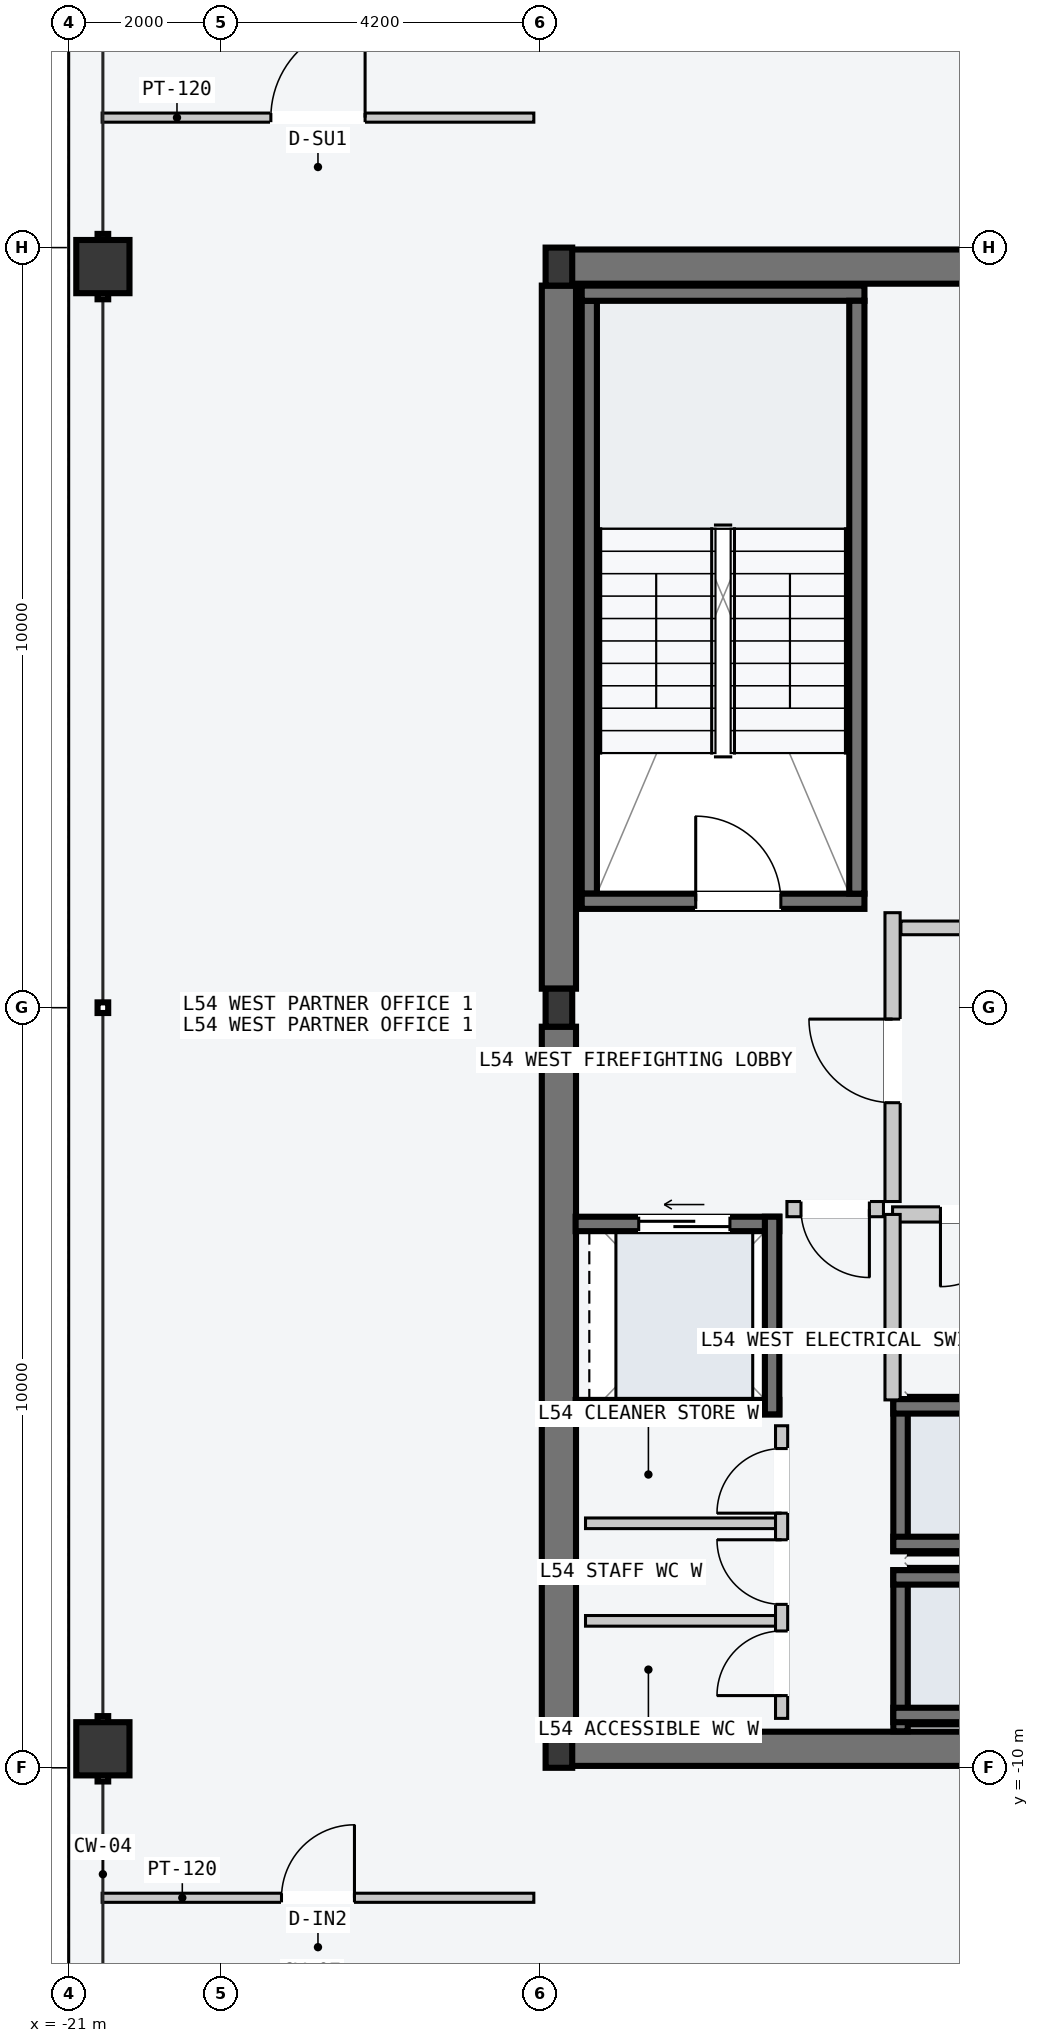
"""IFC4 building model, lengths in metres.
Left out: names, types, materials, properties, quantities, classifications, styles, units other than length and angle.
Written with IfcOpenShell. Run it as: python <this file> out.ifc"""

import sys

from ifc_helpers import new_model, si_unit, direction, frame, frame_2d, origin, origin_2d, place, context, subcontext, project, spatial, rectangle, hollow_rectangle, i_section, extrude, element, fill, save


model = new_model("IFC4")
c1 = context("Model", 3, precision=1e-05, world=origin(), true_north=direction((0.0, 1.0)))
c2 = subcontext(c1, "Body", "Model", "MODEL_VIEW")
j1 = project(units=[si_unit("LENGTHUNIT", "METRE"), si_unit("PLANEANGLEUNIT", "RADIAN")], contexts=[c1])
p1 = place(None, origin())
s1 = spatial("IfcSite", under=j1, at=p1, CompositionType="ELEMENT")
p2 = place(p1, origin())
s2 = spatial("IfcBuilding", under=s1, at=p2, CompositionType="ELEMENT")
p3 = place(p2, frame((0.0, 0.0, 205.5)))
s3 = spatial("IfcBuildingStorey", under=s2, at=p3, CompositionType="ELEMENT", Elevation=205.5)
for number, where, z_axis, x_axis in (
    (1, (-14.53, -9.75, -0.2), (0.0, 0.0, 1.0), (1.0, 0.0, 0.0)),
    (2, (-14.53, 9.75, -0.2), (0.0, 0.0, 1.0), (1.0, 0.0, 0.0)),
):
    element("IfcWall", number, at=place(p3, frame(where, z_axis=z_axis, x_axis=x_axis)), inside=s3, PredefinedType="SHEAR", context=c2, shape_type="SweptSolid", body=[
        extrude(rectangle(XDim=6.46, YDim=0.45, at=frame_2d((3.23, 0.0))), origin(), (0.0, 0.0, 1.0), 3.6),
    ])
for number, where, z_axis, x_axis in (
    (3, (-14.55, -9.5, -0.2), (0.0, 0.0, 1.0), (0.0, 1.0, 0.0)),
    (4, (-14.55, 0.25, -0.2), (0.0, 0.0, 1.0), (0.0, 1.0, 0.0)),
):
    element("IfcWall", number, at=place(p3, frame(where, z_axis=z_axis, x_axis=x_axis)), inside=s3, PredefinedType="SHEAR", context=c2, shape_type="SweptSolid", body=[
        extrude(rectangle(XDim=9.25, YDim=0.45, at=frame_2d((4.625, 0.0))), origin(), (0.0, 0.0, 1.0), 3.6),
    ])
p4 = place(p3, frame((-14.15, 1.5, -0.2), z_axis=(0.0, 0.0, 1.0), x_axis=(0.0, 1.0, 0.0)))
e5 = element("IfcWall", 5, at=p4, inside=s3, PredefinedType="SOLIDWALL", context=c2, shape_type="SweptSolid", body=[
    extrude(rectangle(XDim=7.8, YDim=0.2, at=frame_2d((3.9, 0.0))), origin(), (0.0, 0.0, 1.0), 3.6),
])
p5 = place(p3, frame((-14.25, 1.4, -0.2), z_axis=(0.0, 0.0, 1.0), x_axis=(1.0, 0.0, 0.0)))
e6 = element("IfcWall", 6, at=p5, inside=s3, PredefinedType="SOLIDWALL", context=c2, shape_type="SweptSolid", body=[
    extrude(rectangle(XDim=3.72, YDim=0.2, at=frame_2d((1.86, 0.0))), origin(), (0.0, 0.0, 1.0), 3.6),
])
p6 = place(p5, frame((1.5, 0.0, 0.2)))
e7 = element("IfcOpeningElement", 7, at=p6, cuts=e6, PredefinedType="OPENING", context=c2, shape_type="SweptSolid", body=[
    extrude(rectangle(XDim=1.12, YDim=2.18, at=frame_2d((0.56, 1.09))), frame((0.0, 0.11, 0.0), z_axis=(0.0, -1.0, 0.0), x_axis=(1.0, 0.0, 0.0)), (0.0, 0.0, 1.0), 0.22),
])
p7 = place(p3, frame((-14.25, 9.4, -0.2), z_axis=(0.0, 0.0, 1.0), x_axis=(1.0, 0.0, 0.0)))
e8 = element("IfcWall", 8, at=p7, inside=s3, PredefinedType="SOLIDWALL", context=c2, shape_type="SweptSolid", body=[
    extrude(rectangle(XDim=3.72, YDim=0.2, at=frame_2d((1.86, 0.0))), origin(), (0.0, 0.0, 1.0), 3.6),
])
p8 = place(p3, frame((-10.63, 1.5, -0.2), z_axis=(0.0, 0.0, 1.0), x_axis=(0.0, 1.0, 0.0)))
e9 = element("IfcWall", 9, at=p8, inside=s3, PredefinedType="SOLIDWALL", context=c2, shape_type="SweptSolid", body=[
    extrude(rectangle(XDim=7.8, YDim=0.2, at=frame_2d((3.9, 0.0))), origin(), (0.0, 0.0, 1.0), 3.6),
])
for number, where, z_axis, x_axis in (
    (10, (-14.55, -9.75, 0.0), (0.0, 0.0, 1.0), (1.0, 0.0, 0.0)),
    (11, (-14.55, 0.0, 0.0), (0.0, 0.0, 1.0), (1.0, 0.0, 0.0)),
    (12, (-14.55, 9.75, 0.0), (0.0, 0.0, 1.0), (1.0, 0.0, 0.0)),
):
    element("IfcColumn", number, at=place(p3, frame(where, z_axis=z_axis, x_axis=x_axis)), inside=s3, PredefinedType="COLUMN", context=c2, shape_type="SweptSolid", body=[
        extrude(i_section(OverallWidth=0.35, OverallDepth=0.5, WebThickness=0.02, FlangeThickness=0.032, at=origin_2d()), origin(), (0.0, 0.0, 1.0), 3.6),
    ])
for number, where, z_axis, x_axis in (
    (13, (-20.55, -9.75, 0.0), (0.0, 0.0, 1.0), (0.0, 1.0, 0.0)),
    (14, (-20.55, 9.75, 0.0), (0.0, 0.0, 1.0), (0.0, 1.0, 0.0)),
):
    element("IfcColumn", number, at=place(p3, frame(where, z_axis=z_axis, x_axis=x_axis)), inside=s3, PredefinedType="COLUMN", context=c2, shape_type="SweptSolid", body=[
        extrude(hollow_rectangle(XDim=0.7, YDim=0.7, WallThickness=0.03, at=origin_2d()), origin(), (0.0, 0.0, 1.0), 3.6),
    ])
p9 = place(p3, frame((-10.055, -9.52, -0.2), z_axis=(0.0, 0.0, 1.0), x_axis=(0.0, 1.0, 0.0)))
e15 = element("IfcWall", 15, at=p9, inside=s3, PredefinedType="SOLIDWALL", context=c2, shape_type="SweptSolid", body=[
    extrude(rectangle(XDim=2.12, YDim=0.19, at=frame_2d((1.06, 0.0))), origin(), (0.0, 0.0, 1.0), 3.6),
])
for number, where, z_axis, x_axis in (
    (16, (-10.15, -7.495, -0.2), (0.0, 0.0, 1.0), (1.0, 0.0, 0.0)),
    (17, (-10.15, -9.305, -0.2), (0.0, 0.0, 1.0), (1.0, 0.0, 0.0)),
):
    element("IfcWall", number, at=place(p3, frame(where, z_axis=z_axis, x_axis=x_axis)), inside=s3, PredefinedType="SOLIDWALL", context=c2, shape_type="SweptSolid", body=[
        extrude(rectangle(XDim=2.2, YDim=0.19, at=frame_2d((1.1, 0.0))), origin(), (0.0, 0.0, 1.0), 3.6),
    ])
p10 = place(p3, frame((-10.055, -7.15, -0.2), z_axis=(0.0, 0.0, 1.0), x_axis=(0.0, 1.0, 0.0)))
e18 = element("IfcWall", 18, at=p10, inside=s3, PredefinedType="SOLIDWALL", context=c2, shape_type="SweptSolid", body=[
    extrude(rectangle(XDim=2.0, YDim=0.19, at=frame_2d((1.0, 0.0))), origin(), (0.0, 0.0, 1.0), 3.6),
])
for number, where, z_axis, x_axis in (
    (19, (-10.15, -5.245, -0.2), (0.0, 0.0, 1.0), (1.0, 0.0, 0.0)),
    (20, (-10.15, -7.055, -0.2), (0.0, 0.0, 1.0), (1.0, 0.0, 0.0)),
):
    element("IfcWall", number, at=place(p3, frame(where, z_axis=z_axis, x_axis=x_axis)), inside=s3, PredefinedType="SOLIDWALL", context=c2, shape_type="SweptSolid", body=[
        extrude(rectangle(XDim=2.2, YDim=0.19, at=frame_2d((1.1, 0.0))), origin(), (0.0, 0.0, 1.0), 3.6),
    ])
p11 = place(p3, frame((-14.33, -2.845, -0.2), z_axis=(0.0, 0.0, 1.0), x_axis=(1.0, 0.0, 0.0)))
e21 = element("IfcWall", 21, at=p11, inside=s3, PredefinedType="SOLIDWALL", context=c2, shape_type="SweptSolid", body=[
    extrude(rectangle(XDim=2.68, YDim=0.19, at=frame_2d((1.34, 0.0))), origin(), (0.0, 0.0, 1.0), 3.6),
])
p12 = place(p11, frame((0.83, 0.0, 0.2)))
e22 = element("IfcOpeningElement", 22, at=p12, cuts=e21, PredefinedType="OPENING", context=c2, shape_type="SweptSolid", body=[
    extrude(rectangle(XDim=1.2, YDim=2.2, at=frame_2d((0.6, 1.1))), frame((0.0, 0.105, 0.0), z_axis=(0.0, -1.0, 0.0), x_axis=(1.0, 0.0, 0.0)), (0.0, 0.0, 1.0), 0.21),
])
p13 = place(p3, frame((-14.33, -5.255, -0.2), z_axis=(0.0, 0.0, 1.0), x_axis=(1.0, 0.0, 0.0)))
e23 = element("IfcWall", 23, at=p13, inside=s3, PredefinedType="SOLIDWALL", context=c2, shape_type="SweptSolid", body=[
    extrude(rectangle(XDim=2.68, YDim=0.19, at=frame_2d((1.34, 0.0))), origin(), (0.0, 0.0, 1.0), 3.6),
])
p14 = place(p3, frame((-11.745, -5.35, -0.2), z_axis=(0.0, 0.0, 1.0), x_axis=(0.0, 1.0, 0.0)))
e24 = element("IfcWall", 24, at=p14, inside=s3, PredefinedType="SOLIDWALL", context=c2, shape_type="SweptSolid", body=[
    extrude(rectangle(XDim=2.6, YDim=0.19, at=frame_2d((1.3, 0.0))), origin(), (0.0, 0.0, 1.0), 3.6),
])
p15 = place(p3, frame((-10.16, -2.55, 0.0), z_axis=(0.0, 0.0, 1.0), x_axis=(0.0, 1.0, 0.0)))
e25 = element("IfcWall", 25, at=p15, inside=s3, PredefinedType="PARTITIONING", context=c2, shape_type="SweptSolid", body=[
    extrude(rectangle(XDim=3.8, YDim=0.2, at=frame_2d((1.9, 0.0))), origin(), (0.0, 0.0, 1.0), 3.4),
])
p16 = place(p15, frame((1.3, 0.0, 0.0)))
e26 = element("IfcOpeningElement", 26, at=p16, cuts=e25, PredefinedType="OPENING", context=c2, shape_type="SweptSolid", body=[
    extrude(rectangle(XDim=1.1, YDim=2.15, at=frame_2d((0.55, 1.075))), frame((0.0, 0.11, 0.0), z_axis=(0.0, -1.0, 0.0), x_axis=(1.0, 0.0, 0.0)), (0.0, 0.0, 1.0), 0.22),
])
p17 = place(p3, frame((-10.28, -2.65, 0.0), z_axis=(0.0, 0.0, 1.0), x_axis=(-1.0, 0.0, 0.0)))
e27 = element("IfcWall", 27, at=p17, inside=s3, PredefinedType="PARTITIONING", context=c2, shape_type="SweptSolid", body=[
    extrude(rectangle(XDim=1.27, YDim=0.2, at=frame_2d((0.635, 0.0))), origin(), (0.0, 0.0, 1.0), 3.4),
])
p18 = place(p17, frame((0.185, 0.0, 0.0)))
e28 = element("IfcOpeningElement", 28, at=p18, cuts=e27, PredefinedType="OPENING", context=c2, shape_type="SweptSolid", body=[
    extrude(rectangle(XDim=0.9, YDim=2.15, at=frame_2d((0.45, 1.075))), frame((0.0, 0.11, 0.0), z_axis=(0.0, -1.0, 0.0), x_axis=(1.0, 0.0, 0.0)), (0.0, 0.0, 1.0), 0.22),
])
p19 = place(p3, frame((-7.96, -2.72, 0.0), z_axis=(0.0, 0.0, 1.0), x_axis=(-1.0, 0.0, 0.0)))
e29 = element("IfcWall", 29, at=p19, inside=s3, PredefinedType="PARTITIONING", context=c2, shape_type="SweptSolid", body=[
    extrude(rectangle(XDim=2.2, YDim=0.2, at=frame_2d((1.1, 0.0))), origin(), (0.0, 0.0, 1.0), 3.4),
])
p20 = place(p19, frame((0.62, 0.0, 0.0)))
e30 = element("IfcOpeningElement", 30, at=p20, cuts=e29, PredefinedType="OPENING", context=c2, shape_type="SweptSolid", body=[
    extrude(rectangle(XDim=0.95, YDim=2.1, at=frame_2d((0.475, 1.05))), frame((0.0, 0.11, 0.0), z_axis=(0.0, -1.0, 0.0), x_axis=(1.0, 0.0, 0.0)), (0.0, 0.0, 1.0), 0.22),
])
p21 = place(p3, frame((-10.16, -5.16, 0.0), z_axis=(0.0, 0.0, 1.0), x_axis=(0.0, 1.0, 0.0)))
e31 = element("IfcWall", 31, at=p21, inside=s3, PredefinedType="PARTITIONING", context=c2, shape_type="SweptSolid", body=[
    extrude(rectangle(XDim=2.44, YDim=0.2, at=frame_2d((1.22, 0.0))), origin(), (0.0, 0.0, 1.0), 3.4),
])
for number, where, z_axis, x_axis in (
    (32, (-11.7, -8.067, 0.0), (0.0, 0.0, 1.0), (-1.0, 0.0, 0.0)),
    (33, (-11.7, -6.783, 0.0), (0.0, 0.0, 1.0), (-1.0, 0.0, 0.0)),
):
    element("IfcWall", number, at=place(p3, frame(where, z_axis=z_axis, x_axis=x_axis)), inside=s3, PredefinedType="PARTITIONING", context=c2, shape_type="SweptSolid", body=[
        extrude(rectangle(XDim=2.5, YDim=0.14, at=frame_2d((1.25, 0.0))), origin(), (0.0, 0.0, 1.0), 3.4),
    ])
p22 = place(p3, frame((-11.62, -9.35, 0.0), z_axis=(0.0, 0.0, 1.0), x_axis=(0.0, 1.0, 0.0)))
e34 = element("IfcWall", 34, at=p22, inside=s3, PredefinedType="PARTITIONING", context=c2, shape_type="SweptSolid", body=[
    extrude(rectangle(XDim=3.85, YDim=0.16, at=frame_2d((1.925, 0.0))), origin(), (0.0, 0.0, 1.0), 3.4),
])
p23 = place(p22, frame((0.3, 0.0, 0.0)))
e35 = element("IfcOpeningElement", 35, at=p23, cuts=e34, PredefinedType="OPENING", context=c2, shape_type="SweptSolid", body=[
    extrude(rectangle(XDim=0.85, YDim=2.12, at=frame_2d((0.425, 1.06))), frame((0.0, 0.09, 0.0), z_axis=(0.0, -1.0, 0.0), x_axis=(1.0, 0.0, 0.0)), (0.0, 0.0, 1.0), 0.18),
])
p24 = place(p22, frame((1.5, 0.0, 0.0)))
e36 = element("IfcOpeningElement", 36, at=p24, cuts=e34, PredefinedType="OPENING", context=c2, shape_type="SweptSolid", body=[
    extrude(rectangle(XDim=0.85, YDim=2.12, at=frame_2d((0.425, 1.06))), frame((0.0, 0.09, 0.0), z_axis=(0.0, -1.0, 0.0), x_axis=(1.0, 0.0, 0.0)), (0.0, 0.0, 1.0), 0.18),
])
p25 = place(p22, frame((2.7, 0.0, 0.0)))
e37 = element("IfcOpeningElement", 37, at=p25, cuts=e34, PredefinedType="OPENING", context=c2, shape_type="SweptSolid", body=[
    extrude(rectangle(XDim=0.85, YDim=2.12, at=frame_2d((0.425, 1.06))), frame((0.0, 0.09, 0.0), z_axis=(0.0, -1.0, 0.0), x_axis=(1.0, 0.0, 0.0)), (0.0, 0.0, 1.0), 0.18),
])
p26 = place(p3, frame((-10.05, 1.05, 0.0), z_axis=(0.0, 0.0, 1.0), x_axis=(1.0, 0.0, 0.0)))
e38 = element("IfcWall", 38, at=p26, inside=s3, PredefinedType="PARTITIONING", context=c2, shape_type="SweptSolid", body=[
    extrude(rectangle(XDim=8.79, YDim=0.18, at=frame_2d((4.395, 0.0))), origin(), (0.0, 0.0, 1.0), 3.4),
])
p27 = place(p3, frame((-20.56, 11.71, 0.0), z_axis=(0.0, 0.0, 1.0), x_axis=(1.0, 0.0, 0.0)))
e39 = element("IfcWall", 39, at=p27, inside=s3, PredefinedType="PARTITIONING", context=c2, shape_type="SweptSolid", body=[
    extrude(rectangle(XDim=5.68, YDim=0.12, at=frame_2d((2.84, 0.0))), origin(), (0.0, 0.0, 1.0), 3.4),
])
p28 = place(p27, frame((2.22, 0.0, 0.0)))
e40 = element("IfcOpeningElement", 40, at=p28, cuts=e39, PredefinedType="OPENING", context=c2, shape_type="SweptSolid", body=[
    extrude(rectangle(XDim=1.24, YDim=2.24, at=frame_2d((0.62, 1.12))), frame((0.0, 0.07, 0.0), z_axis=(0.0, -1.0, 0.0), x_axis=(1.0, 0.0, 0.0)), (0.0, 0.0, 1.0), 0.14),
])
p29 = place(p3, frame((-20.56, -11.71, 0.0), z_axis=(0.0, 0.0, 1.0), x_axis=(1.0, 0.0, 0.0)))
e41 = element("IfcWall", 41, at=p29, inside=s3, PredefinedType="PARTITIONING", context=c2, shape_type="SweptSolid", body=[
    extrude(rectangle(XDim=5.68, YDim=0.12, at=frame_2d((2.84, 0.0))), origin(), (0.0, 0.0, 1.0), 3.4),
])
p30 = place(p29, frame((2.36, 0.0, 0.0)))
e42 = element("IfcOpeningElement", 42, at=p30, cuts=e41, PredefinedType="OPENING", context=c2, shape_type="SweptSolid", body=[
    extrude(rectangle(XDim=0.96, YDim=2.18, at=frame_2d((0.48, 1.09))), frame((0.0, 0.07, 0.0), z_axis=(0.0, -1.0, 0.0), x_axis=(1.0, 0.0, 0.0)), (0.0, 0.0, 1.0), 0.14),
])
p31 = place(p6, origin())
e43 = element("IfcDoor", 43, at=p31, inside=s3, OperationType="SINGLE_SWING_LEFT", PredefinedType="DOOR", context=c2, shape_type="SweptSolid", body=[
    extrude(rectangle(XDim=1.12, YDim=2.18, at=frame_2d((0.56, 1.09))), frame((0.0, 0.025, 0.0), z_axis=(0.0, -1.0, 0.0), x_axis=(1.0, 0.0, 0.0)), (0.0, 0.0, 1.0), 0.05),
])
fill(e7, e43)
p32 = place(p12, origin())
e44 = element("IfcDoor", 44, at=p32, inside=s3, OperationType="SLIDING_TO_LEFT", PredefinedType="DOOR", context=c2, shape_type="SweptSolid", body=[
    extrude(rectangle(XDim=1.2, YDim=2.2, at=frame_2d((0.6, 1.1))), frame((0.0, 0.025, 0.0), z_axis=(0.0, -1.0, 0.0), x_axis=(1.0, 0.0, 0.0)), (0.0, 0.0, 1.0), 0.05),
])
fill(e22, e44)
p33 = place(p16, origin())
e45 = element("IfcDoor", 45, at=p33, inside=s3, OperationType="SINGLE_SWING_RIGHT", PredefinedType="DOOR", context=c2, shape_type="SweptSolid", body=[
    extrude(rectangle(XDim=1.1, YDim=2.15, at=frame_2d((0.55, 1.075))), frame((0.0, 0.025, 0.0), z_axis=(0.0, -1.0, 0.0), x_axis=(1.0, 0.0, 0.0)), (0.0, 0.0, 1.0), 0.05),
])
fill(e26, e45)
p34 = place(p18, origin())
e46 = element("IfcDoor", 46, at=p34, inside=s3, OperationType="SINGLE_SWING_LEFT", PredefinedType="DOOR", context=c2, shape_type="SweptSolid", body=[
    extrude(rectangle(XDim=0.9, YDim=2.15, at=frame_2d((0.45, 1.075))), frame((0.0, 0.025, 0.0), z_axis=(0.0, -1.0, 0.0), x_axis=(1.0, 0.0, 0.0)), (0.0, 0.0, 1.0), 0.05),
])
fill(e28, e46)
p35 = place(p20, origin())
e47 = element("IfcDoor", 47, at=p35, inside=s3, OperationType="SINGLE_SWING_RIGHT", PredefinedType="DOOR", context=c2, shape_type="SweptSolid", body=[
    extrude(rectangle(XDim=0.95, YDim=2.1, at=frame_2d((0.475, 1.05))), frame((0.0, 0.025, 0.0), z_axis=(0.0, -1.0, 0.0), x_axis=(1.0, 0.0, 0.0)), (0.0, 0.0, 1.0), 0.05),
])
fill(e30, e47)
p36 = place(p23, origin())
e48 = element("IfcDoor", 48, at=p36, inside=s3, OperationType="SINGLE_SWING_LEFT", PredefinedType="DOOR", context=c2, shape_type="SweptSolid", body=[
    extrude(rectangle(XDim=0.85, YDim=2.12, at=frame_2d((0.425, 1.06))), frame((0.0, 0.025, 0.0), z_axis=(0.0, -1.0, 0.0), x_axis=(1.0, 0.0, 0.0)), (0.0, 0.0, 1.0), 0.05),
])
fill(e35, e48)
p37 = place(p24, origin())
e49 = element("IfcDoor", 49, at=p37, inside=s3, OperationType="SINGLE_SWING_RIGHT", PredefinedType="DOOR", context=c2, shape_type="SweptSolid", body=[
    extrude(rectangle(XDim=0.85, YDim=2.12, at=frame_2d((0.425, 1.06))), frame((0.0, 0.025, 0.0), z_axis=(0.0, -1.0, 0.0), x_axis=(1.0, 0.0, 0.0)), (0.0, 0.0, 1.0), 0.05),
])
fill(e36, e49)
p38 = place(p25, origin())
e50 = element("IfcDoor", 50, at=p38, inside=s3, OperationType="SINGLE_SWING_LEFT", PredefinedType="DOOR", context=c2, shape_type="SweptSolid", body=[
    extrude(rectangle(XDim=0.85, YDim=2.12, at=frame_2d((0.425, 1.06))), frame((0.0, 0.025, 0.0), z_axis=(0.0, -1.0, 0.0), x_axis=(1.0, 0.0, 0.0)), (0.0, 0.0, 1.0), 0.05),
])
fill(e37, e50)
p39 = place(p28, origin())
e51 = element("IfcDoor", 51, at=p39, inside=s3, OperationType="SINGLE_SWING_RIGHT", PredefinedType="DOOR", context=c2, shape_type="SweptSolid", body=[
    extrude(rectangle(XDim=1.24, YDim=2.24, at=frame_2d((0.62, 1.12))), frame((0.0, 0.025, 0.0), z_axis=(0.0, -1.0, 0.0), x_axis=(1.0, 0.0, 0.0)), (0.0, 0.0, 1.0), 0.05),
])
fill(e40, e51)
p40 = place(p30, origin())
e52 = element("IfcDoor", 52, at=p40, inside=s3, OperationType="SINGLE_SWING_RIGHT", PredefinedType="DOOR", context=c2, shape_type="SweptSolid", body=[
    extrude(rectangle(XDim=0.96, YDim=2.18, at=frame_2d((0.48, 1.09))), frame((0.0, 0.025, 0.0), z_axis=(0.0, -1.0, 0.0), x_axis=(1.0, 0.0, 0.0)), (0.0, 0.0, 1.0), 0.05),
])
fill(e42, e52)
save(model, sys.argv[1])
